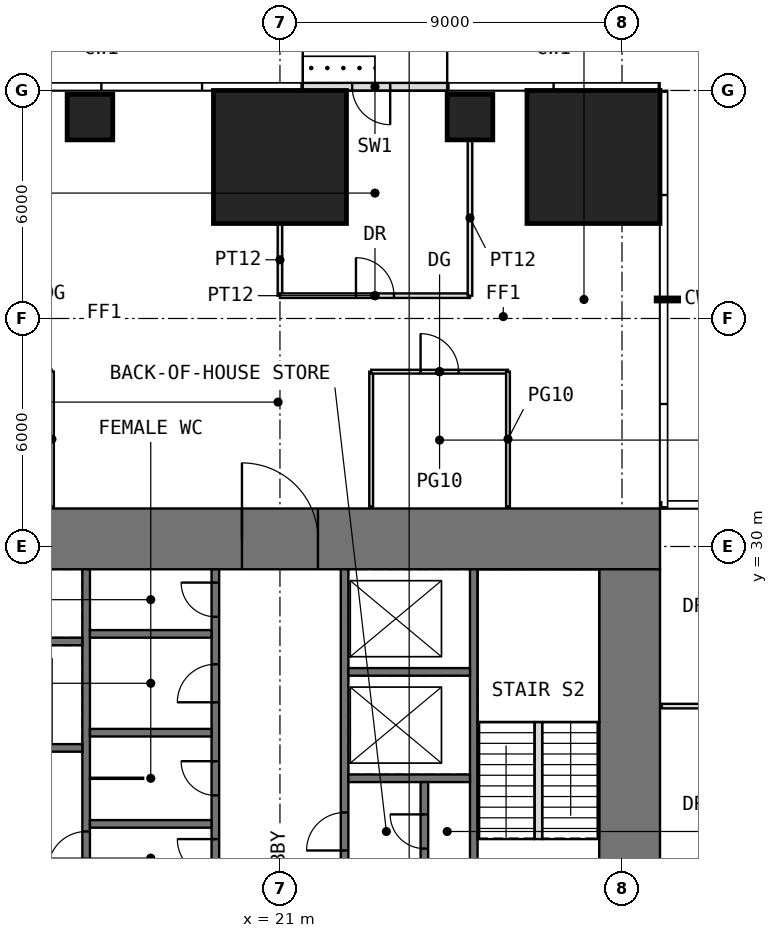
"""IFC4 building model, lengths in metres.
Left out: names, types, materials, properties, quantities, classifications, styles, units other than length and angle.
Written with IfcOpenShell. Run it as: python <this file> out.ifc"""

import sys

from ifc_helpers import new_model, si_unit, direction, frame, frame_2d, origin, origin_2d, place, context, subcontext, project, spatial, rectangle, extrude, element, fill, save


model = new_model("IFC4")
c1 = context("Model", 3, precision=1e-05, world=origin(), true_north=direction((0.0, 1.0)))
c2 = subcontext(c1, "Body", "Model", "MODEL_VIEW")
j1 = project(units=[si_unit("LENGTHUNIT", "METRE"), si_unit("PLANEANGLEUNIT", "RADIAN")], contexts=[c1])
p1 = place(None, origin())
s1 = spatial("IfcSite", under=j1, at=p1, CompositionType="ELEMENT")
p2 = place(p1, origin())
s2 = spatial("IfcBuilding", under=s1, at=p2, CompositionType="ELEMENT")
p3 = place(p2, frame((0.0, 0.0, 96.5)))
s3 = spatial("IfcBuildingStorey", under=s2, at=p3, CompositionType="ELEMENT", Elevation=96.5)
p4 = place(p3, frame((16.0, 41.3, 0.0), z_axis=(0.0, 0.0, 1.0), x_axis=(1.0, 0.0, 0.0)))
e1 = element("IfcColumn", 1, at=p4, inside=s3, PredefinedType="COLUMN", context=c2, shape_type="SweptSolid", body=[
    extrude(rectangle(XDim=1.2, YDim=1.2, at=origin_2d()), origin(), (0.0, 0.0, 1.0), 4.0),
])
p5 = place(p3, frame((21.0, 40.25, 0.0), z_axis=(0.0, 0.0, 1.0), x_axis=(1.0, 0.0, 0.0)))
e2 = element("IfcColumn", 2, at=p5, inside=s3, PredefinedType="COLUMN", context=c2, shape_type="SweptSolid", body=[
    extrude(rectangle(XDim=3.5, YDim=3.5, at=origin_2d()), origin(), (0.0, 0.0, 1.0), 4.0),
])
p6 = place(p3, frame((26.0, 41.3, 0.0), z_axis=(0.0, 0.0, 1.0), x_axis=(1.0, 0.0, 0.0)))
e3 = element("IfcColumn", 3, at=p6, inside=s3, PredefinedType="COLUMN", context=c2, shape_type="SweptSolid", body=[
    extrude(rectangle(XDim=1.2, YDim=1.2, at=origin_2d()), origin(), (0.0, 0.0, 1.0), 4.0),
])
p7 = place(p3, frame((29.25, 40.25, 0.0), z_axis=(0.0, 0.0, 1.0), x_axis=(1.0, 0.0, 0.0)))
e4 = element("IfcColumn", 4, at=p7, inside=s3, PredefinedType="COLUMN", context=c2, shape_type="SweptSolid", body=[
    extrude(rectangle(XDim=3.5, YDim=3.5, at=origin_2d()), origin(), (0.0, 0.0, 1.0), 4.0),
])
p8 = place(p3, frame((25.4, 42.1, 0.0), z_axis=(0.0, 0.0, 1.0), x_axis=(-1.0, 0.0, 0.0)))
e5 = element("IfcWall", 5, at=p8, inside=s3, PredefinedType="USERDEFINED", context=c2, shape_type="SweptSolid", body=[
    extrude(rectangle(XDim=3.8, YDim=0.2, at=frame_2d((1.9, 0.0))), origin(), (0.0, 0.0, 1.0), 3.75),
])
p9 = place(p8, frame((1.5, 0.0, 0.0)))
e6 = element("IfcOpeningElement", 6, at=p9, cuts=e5, PredefinedType="OPENING", context=c2, shape_type="SweptSolid", body=[
    extrude(rectangle(XDim=1.0, YDim=2.4, at=frame_2d((0.5, 1.2))), frame((0.0, 0.11, 0.0), z_axis=(0.0, -1.0, 0.0), x_axis=(1.0, 0.0, 0.0)), (0.0, 0.0, 1.0), 0.22),
])
p10 = place(p3, frame((11.0, 30.2, -0.05), z_axis=(0.0, 0.0, 1.0), x_axis=(1.0, 0.0, 0.0)))
e7 = element("IfcWall", 7, at=p10, inside=s3, PredefinedType="SHEAR", context=c2, shape_type="SweptSolid", body=[
    extrude(rectangle(XDim=20.0, YDim=1.6, at=frame_2d((10.0, 0.0))), origin(), (0.0, 0.0, 1.0), 4.0),
])
p11 = place(p10, frame((9.0, 0.0, 0.05)))
e8 = element("IfcOpeningElement", 8, at=p11, cuts=e7, PredefinedType="OPENING", context=c2, shape_type="SweptSolid", body=[
    extrude(rectangle(XDim=2.0, YDim=2.2, at=frame_2d((1.0, 1.1))), frame((0.0, 0.81, 0.0), z_axis=(0.0, -1.0, 0.0), x_axis=(1.0, 0.0, 0.0)), (0.0, 0.0, 1.0), 1.62),
])
p12 = place(p3, frame((30.2, 12.6, -0.05), z_axis=(0.0, 0.0, 1.0), x_axis=(0.0, 1.0, 0.0)))
e9 = element("IfcWall", 9, at=p12, inside=s3, PredefinedType="SHEAR", context=c2, shape_type="SweptSolid", body=[
    extrude(rectangle(XDim=16.8, YDim=1.6, at=frame_2d((8.4, 0.0))), origin(), (0.0, 0.0, 1.0), 4.0),
])
p13 = place(p12, frame((5.9, 0.0, 0.05)))
e10 = element("IfcOpeningElement", 10, at=p13, cuts=e9, PredefinedType="OPENING", context=c2, shape_type="SweptSolid", body=[
    extrude(rectangle(XDim=1.0, YDim=2.2, at=frame_2d((0.5, 1.1))), frame((0.0, 0.81, 0.0), z_axis=(0.0, -1.0, 0.0), x_axis=(1.0, 0.0, 0.0)), (0.0, 0.0, 1.0), 1.62),
])
p14 = place(p3, frame((15.9, 12.6, -0.05), z_axis=(0.0, 0.0, 1.0), x_axis=(0.0, 1.0, 0.0)))
e11 = element("IfcWall", 11, at=p14, inside=s3, PredefinedType="SHEAR", context=c2, shape_type="SweptSolid", body=[
    extrude(rectangle(XDim=16.8, YDim=0.2, at=frame_2d((8.4, 0.0))), origin(), (0.0, 0.0, 1.0), 4.0),
])
p15 = place(p14, frame((8.9, 0.0, 0.05)))
e12 = element("IfcOpeningElement", 12, at=p15, cuts=e11, PredefinedType="OPENING", context=c2, shape_type="SweptSolid", body=[
    extrude(rectangle(XDim=1.0, YDim=2.2, at=frame_2d((0.5, 1.1))), frame((0.0, 0.11, 0.0), z_axis=(0.0, -1.0, 0.0), x_axis=(1.0, 0.0, 0.0)), (0.0, 0.0, 1.0), 0.22),
])
p16 = place(p3, frame((19.3, 12.6, -0.05), z_axis=(0.0, 0.0, 1.0), x_axis=(0.0, 1.0, 0.0)))
e13 = element("IfcWall", 13, at=p16, inside=s3, PredefinedType="SHEAR", context=c2, shape_type="SweptSolid", body=[
    extrude(rectangle(XDim=16.8, YDim=0.2, at=frame_2d((8.4, 0.0))), origin(), (0.0, 0.0, 1.0), 4.0),
])
p17 = place(p16, frame((8.7, 0.0, 0.05)))
e14 = element("IfcOpeningElement", 14, at=p17, cuts=e13, PredefinedType="OPENING", context=c2, shape_type="SweptSolid", body=[
    extrude(rectangle(XDim=1.0, YDim=2.2, at=frame_2d((0.5, 1.1))), frame((0.0, 0.11, 0.0), z_axis=(0.0, -1.0, 0.0), x_axis=(1.0, 0.0, 0.0)), (0.0, 0.0, 1.0), 0.22),
])
p18 = place(p16, frame((10.85, 0.0, 0.05)))
e15 = element("IfcOpeningElement", 15, at=p18, cuts=e13, PredefinedType="OPENING", context=c2, shape_type="SweptSolid", body=[
    extrude(rectangle(XDim=0.9, YDim=2.2, at=frame_2d((0.45, 1.1))), frame((0.0, 0.11, 0.0), z_axis=(0.0, -1.0, 0.0), x_axis=(1.0, 0.0, 0.0)), (0.0, 0.0, 1.0), 0.22),
])
p19 = place(p16, frame((13.3, 0.0, 0.05)))
e16 = element("IfcOpeningElement", 16, at=p19, cuts=e13, PredefinedType="OPENING", context=c2, shape_type="SweptSolid", body=[
    extrude(rectangle(XDim=1.0, YDim=2.2, at=frame_2d((0.5, 1.1))), frame((0.0, 0.11, 0.0), z_axis=(0.0, -1.0, 0.0), x_axis=(1.0, 0.0, 0.0)), (0.0, 0.0, 1.0), 0.22),
])
p20 = place(p16, frame((15.55, 0.0, 0.05)))
e17 = element("IfcOpeningElement", 17, at=p20, cuts=e13, PredefinedType="OPENING", context=c2, shape_type="SweptSolid", body=[
    extrude(rectangle(XDim=0.9, YDim=2.2, at=frame_2d((0.45, 1.1))), frame((0.0, 0.11, 0.0), z_axis=(0.0, -1.0, 0.0), x_axis=(1.0, 0.0, 0.0)), (0.0, 0.0, 1.0), 0.22),
])
p21 = place(p16, frame((0.75, 0.0, 0.05)))
e18 = element("IfcOpeningElement", 18, at=p21, cuts=e13, PredefinedType="OPENING", context=c2, shape_type="SweptSolid", body=[
    extrude(rectangle(XDim=1.1, YDim=2.2, at=frame_2d((0.55, 1.1))), frame((0.0, 0.11, 0.0), z_axis=(0.0, -1.0, 0.0), x_axis=(1.0, 0.0, 0.0)), (0.0, 0.0, 1.0), 0.22),
])
p22 = place(p16, frame((3.55, 0.0, 0.05)))
e19 = element("IfcOpeningElement", 19, at=p22, cuts=e13, PredefinedType="OPENING", context=c2, shape_type="SweptSolid", body=[
    extrude(rectangle(XDim=1.1, YDim=2.2, at=frame_2d((0.55, 1.1))), frame((0.0, 0.11, 0.0), z_axis=(0.0, -1.0, 0.0), x_axis=(1.0, 0.0, 0.0)), (0.0, 0.0, 1.0), 0.22),
])
p23 = place(p16, frame((6.35, 0.0, 0.05)))
e20 = element("IfcOpeningElement", 20, at=p23, cuts=e13, PredefinedType="OPENING", context=c2, shape_type="SweptSolid", body=[
    extrude(rectangle(XDim=1.1, YDim=2.2, at=frame_2d((0.55, 1.1))), frame((0.0, 0.11, 0.0), z_axis=(0.0, -1.0, 0.0), x_axis=(1.0, 0.0, 0.0)), (0.0, 0.0, 1.0), 0.22),
])
p24 = place(p3, frame((22.7, 12.6, -0.05), z_axis=(0.0, 0.0, 1.0), x_axis=(0.0, 1.0, 0.0)))
e21 = element("IfcWall", 21, at=p24, inside=s3, PredefinedType="SHEAR", context=c2, shape_type="SweptSolid", body=[
    extrude(rectangle(XDim=16.8, YDim=0.2, at=frame_2d((8.4, 0.0))), origin(), (0.0, 0.0, 1.0), 4.0),
])
p25 = place(p24, frame((3.05, 0.0, 0.05)))
e22 = element("IfcOpeningElement", 22, at=p25, cuts=e21, PredefinedType="OPENING", context=c2, shape_type="SweptSolid", body=[
    extrude(rectangle(XDim=0.9, YDim=2.2, at=frame_2d((0.45, 1.1))), frame((0.0, 0.11, 0.0), z_axis=(0.0, -1.0, 0.0), x_axis=(1.0, 0.0, 0.0)), (0.0, 0.0, 1.0), 0.22),
])
p26 = place(p24, frame((7.1, 0.0, 0.05)))
e23 = element("IfcOpeningElement", 23, at=p26, cuts=e21, PredefinedType="OPENING", context=c2, shape_type="SweptSolid", body=[
    extrude(rectangle(XDim=1.0, YDim=2.2, at=frame_2d((0.5, 1.1))), frame((0.0, 0.11, 0.0), z_axis=(0.0, -1.0, 0.0), x_axis=(1.0, 0.0, 0.0)), (0.0, 0.0, 1.0), 0.22),
])
p27 = place(p24, frame((1.55, 0.0, 0.05)))
e24 = element("IfcOpeningElement", 24, at=p27, cuts=e21, PredefinedType="OPENING", context=c2, shape_type="SweptSolid", body=[
    extrude(rectangle(XDim=0.9, YDim=2.2, at=frame_2d((0.45, 1.1))), frame((0.0, 0.11, 0.0), z_axis=(0.0, -1.0, 0.0), x_axis=(1.0, 0.0, 0.0)), (0.0, 0.0, 1.0), 0.22),
])
p28 = place(p24, frame((4.95, 0.0, 0.05)))
e25 = element("IfcOpeningElement", 25, at=p28, cuts=e21, PredefinedType="OPENING", context=c2, shape_type="SweptSolid", body=[
    extrude(rectangle(XDim=0.9, YDim=2.2, at=frame_2d((0.45, 1.1))), frame((0.0, 0.11, 0.0), z_axis=(0.0, -1.0, 0.0), x_axis=(1.0, 0.0, 0.0)), (0.0, 0.0, 1.0), 0.22),
])
p29 = place(p24, frame((9.4, 0.0, 0.05)))
e26 = element("IfcOpeningElement", 26, at=p29, cuts=e21, PredefinedType="OPENING", context=c2, shape_type="SweptSolid", body=[
    extrude(rectangle(XDim=1.0, YDim=2.2, at=frame_2d((0.5, 1.1))), frame((0.0, 0.11, 0.0), z_axis=(0.0, -1.0, 0.0), x_axis=(1.0, 0.0, 0.0)), (0.0, 0.0, 1.0), 0.22),
])
p30 = place(p3, frame((26.1, 12.6, -0.05), z_axis=(0.0, 0.0, 1.0), x_axis=(0.0, 1.0, 0.0)))
e27 = element("IfcWall", 27, at=p30, inside=s3, PredefinedType="SHEAR", context=c2, shape_type="SweptSolid", body=[
    extrude(rectangle(XDim=16.8, YDim=0.2, at=frame_2d((8.4, 0.0))), origin(), (0.0, 0.0, 1.0), 4.0),
])
p31 = place(p30, frame((6.9, 0.0, 0.05)))
e28 = element("IfcOpeningElement", 28, at=p31, cuts=e27, PredefinedType="OPENING", context=c2, shape_type="SweptSolid", body=[
    extrude(rectangle(XDim=1.0, YDim=2.2, at=frame_2d((0.5, 1.1))), frame((0.0, 0.11, 0.0), z_axis=(0.0, -1.0, 0.0), x_axis=(1.0, 0.0, 0.0)), (0.0, 0.0, 1.0), 0.22),
])
p32 = place(p3, frame((12.6, 24.7, -0.05), z_axis=(0.0, 0.0, 1.0), x_axis=(1.0, 0.0, 0.0)))
e29 = element("IfcWall", 29, at=p32, inside=s3, PredefinedType="SHEAR", context=c2, shape_type="SweptSolid", body=[
    extrude(rectangle(XDim=3.2, YDim=0.2, at=frame_2d((1.6, 0.0))), origin(), (0.0, 0.0, 1.0), 4.0),
])
p33 = place(p32, frame((1.0, 0.0, 0.05)))
e30 = element("IfcOpeningElement", 30, at=p33, cuts=e29, PredefinedType="OPENING", context=c2, shape_type="SweptSolid", body=[
    extrude(rectangle(XDim=1.2, YDim=2.2, at=frame_2d((0.6, 1.1))), frame((0.0, 0.11, 0.0), z_axis=(0.0, -1.0, 0.0), x_axis=(1.0, 0.0, 0.0)), (0.0, 0.0, 1.0), 0.22),
])
for number, where, z_axis, x_axis in (
    (31, (12.6, 27.5, -0.05), (0.0, 0.0, 1.0), (1.0, 0.0, 0.0)),
    (32, (16.0, 22.7, -0.05), (0.0, 0.0, 1.0), (1.0, 0.0, 0.0)),
    (33, (16.0, 25.1, -0.05), (0.0, 0.0, 1.0), (1.0, 0.0, 0.0)),
    (34, (16.0, 27.7, -0.05), (0.0, 0.0, 1.0), (1.0, 0.0, 0.0)),
    (35, (22.8, 23.9, -0.05), (0.0, 0.0, 1.0), (1.0, 0.0, 0.0)),
    (36, (22.8, 26.7, -0.05), (0.0, 0.0, 1.0), (1.0, 0.0, 0.0)),
):
    element("IfcWall", number, at=place(p3, frame(where, z_axis=z_axis, x_axis=x_axis)), inside=s3, PredefinedType="SHEAR", context=c2, shape_type="SweptSolid", body=[
        extrude(rectangle(XDim=3.2, YDim=0.2, at=frame_2d((1.6, 0.0))), origin(), (0.0, 0.0, 1.0), 4.0),
    ])
p34 = place(p3, frame((16.0, 23.9, 0.0), z_axis=(0.0, 0.0, 1.0), x_axis=(1.0, 0.0, 0.0)))
e37 = element("IfcWall", 37, at=p34, inside=s3, PredefinedType="PARTITIONING", context=c2, shape_type="SweptSolid", body=[
    extrude(rectangle(XDim=1.4, YDim=0.03, at=frame_2d((0.7, 0.0))), origin(), (0.0, 0.0, 1.0), 3.75),
])
p35 = place(p3, frame((24.8, 21.2, -0.05), z_axis=(0.0, 0.0, 1.0), x_axis=(0.0, 1.0, 0.0)))
e38 = element("IfcWall", 38, at=p35, inside=s3, PredefinedType="SHEAR", context=c2, shape_type="SweptSolid", body=[
    extrude(rectangle(XDim=2.6, YDim=0.2, at=frame_2d((1.3, 0.0))), origin(), (0.0, 0.0, 1.0), 4.0),
])
p36 = place(p35, frame((0.85, 0.0, 0.05)))
e39 = element("IfcOpeningElement", 39, at=p36, cuts=e38, PredefinedType="OPENING", context=c2, shape_type="SweptSolid", body=[
    extrude(rectangle(XDim=0.9, YDim=2.2, at=frame_2d((0.45, 1.1))), frame((0.0, 0.11, 0.0), z_axis=(0.0, -1.0, 0.0), x_axis=(1.0, 0.0, 0.0)), (0.0, 0.0, 1.0), 0.22),
])
p37 = place(p3, frame((15.0, 31.05, 0.0), z_axis=(0.0, 0.0, 1.0), x_axis=(0.0, 1.0, 0.0)))
e40 = element("IfcWall", 40, at=p37, inside=s3, PredefinedType="PARTITIONING", context=c2, shape_type="SweptSolid", body=[
    extrude(rectangle(XDim=3.55, YDim=0.1, at=frame_2d((1.775, 0.0))), origin(), (0.0, 0.0, 1.0), 3.75),
])
p38 = place(p3, frame((21.0, 36.6, 0.0), z_axis=(0.0, 0.0, 1.0), x_axis=(0.0, 1.0, 0.0)))
e41 = element("IfcWall", 41, at=p38, inside=s3, PredefinedType="PARTITIONING", context=c2, shape_type="SweptSolid", body=[
    extrude(rectangle(XDim=1.89, YDim=0.12, at=frame_2d((0.945, 0.0))), origin(), (0.0, 0.0, 1.0), 3.75),
])
p39 = place(p3, frame((21.0, 36.6, 0.0), z_axis=(0.0, 0.0, 1.0), x_axis=(1.0, 0.0, 0.0)))
e42 = element("IfcWall", 42, at=p39, inside=s3, PredefinedType="PARTITIONING", context=c2, shape_type="SweptSolid", body=[
    extrude(rectangle(XDim=5.0, YDim=0.12, at=frame_2d((2.5, 0.0))), origin(), (0.0, 0.0, 1.0), 3.75),
])
p40 = place(p39, frame((2.0, 0.0, 0.0)))
e43 = element("IfcOpeningElement", 43, at=p40, cuts=e42, PredefinedType="OPENING", context=c2, shape_type="SweptSolid", body=[
    extrude(rectangle(XDim=1.0, YDim=2.2, at=frame_2d((0.5, 1.1))), frame((0.0, 0.07, 0.0), z_axis=(0.0, -1.0, 0.0), x_axis=(1.0, 0.0, 0.0)), (0.0, 0.0, 1.0), 0.14),
])
p41 = place(p3, frame((23.4, 31.05, 0.0), z_axis=(0.0, 0.0, 1.0), x_axis=(0.0, 1.0, 0.0)))
e44 = element("IfcWall", 44, at=p41, inside=s3, PredefinedType="PARTITIONING", context=c2, shape_type="SweptSolid", body=[
    extrude(rectangle(XDim=3.55, YDim=0.1, at=frame_2d((1.775, 0.0))), origin(), (0.0, 0.0, 1.0), 3.75),
])
p42 = place(p3, frame((23.4, 34.6, 0.0), z_axis=(0.0, 0.0, 1.0), x_axis=(1.0, 0.0, 0.0)))
e45 = element("IfcWall", 45, at=p42, inside=s3, PredefinedType="PARTITIONING", context=c2, shape_type="SweptSolid", body=[
    extrude(rectangle(XDim=3.6, YDim=0.1, at=frame_2d((1.8, 0.0))), origin(), (0.0, 0.0, 1.0), 3.75),
])
p43 = place(p42, frame((1.3, 0.0, 0.0)))
e46 = element("IfcOpeningElement", 46, at=p43, cuts=e45, PredefinedType="OPENING", context=c2, shape_type="SweptSolid", body=[
    extrude(rectangle(XDim=1.0, YDim=2.4, at=frame_2d((0.5, 1.2))), frame((0.0, 0.06, 0.0), z_axis=(0.0, -1.0, 0.0), x_axis=(1.0, 0.0, 0.0)), (0.0, 0.0, 1.0), 0.12),
])
p44 = place(p3, frame((26.0, 36.6, 0.0), z_axis=(0.0, 0.0, 1.0), x_axis=(0.0, 1.0, 0.0)))
e47 = element("IfcWall", 47, at=p44, inside=s3, PredefinedType="PARTITIONING", context=c2, shape_type="SweptSolid", body=[
    extrude(rectangle(XDim=4.09, YDim=0.12, at=frame_2d((2.045, 0.0))), origin(), (0.0, 0.0, 1.0), 3.75),
])
p45 = place(p3, frame((27.0, 31.05, 0.0), z_axis=(0.0, 0.0, 1.0), x_axis=(0.0, 1.0, 0.0)))
e48 = element("IfcWall", 48, at=p45, inside=s3, PredefinedType="PARTITIONING", context=c2, shape_type="SweptSolid", body=[
    extrude(rectangle(XDim=3.55, YDim=0.1, at=frame_2d((1.775, 0.0))), origin(), (0.0, 0.0, 1.0), 3.75),
])
p46 = place(p3, frame((31.05, 25.8, 0.0), z_axis=(0.0, 0.0, 1.0), x_axis=(1.0, 0.0, 0.0)))
e49 = element("IfcWall", 49, at=p46, inside=s3, PredefinedType="PARTITIONING", context=c2, shape_type="SweptSolid", body=[
    extrude(rectangle(XDim=3.05, YDim=0.12, at=frame_2d((1.525, 0.0))), origin(), (0.0, 0.0, 1.0), 3.75),
])
p47 = place(p3, frame((27.8, 22.3, 0.0), z_axis=(0.0, 0.0, 1.0), x_axis=(0.0, 1.0, 0.0)))
e50 = element("IfcWall", 50, at=p47, inside=s3, PredefinedType="PARTITIONING", context=c2, shape_type="SweptSolid", body=[
    extrude(rectangle(XDim=3.08, YDim=0.2, at=frame_2d((1.54, 0.0))), origin(), (0.0, 0.0, 1.0), 4.0),
])
p48 = place(p9, origin())
e51 = element("IfcDoor", 51, at=p48, inside=s3, OperationType="SINGLE_SWING_LEFT", PredefinedType="DOOR", context=c2, shape_type="SweptSolid", body=[
    extrude(rectangle(XDim=1.0, YDim=2.4, at=frame_2d((0.5, 1.2))), frame((0.0, 0.025, 0.0), z_axis=(0.0, -1.0, 0.0), x_axis=(1.0, 0.0, 0.0)), (0.0, 0.0, 1.0), 0.05),
])
fill(e6, e51)
p49 = place(p11, origin())
e52 = element("IfcDoor", 52, at=p49, inside=s3, OperationType="DOUBLE_DOOR_SINGLE_SWING", PredefinedType="DOOR", context=c2, shape_type="SweptSolid", body=[
    extrude(rectangle(XDim=2.0, YDim=2.2, at=frame_2d((1.0, 1.1))), frame((0.0, 0.025, 0.0), z_axis=(0.0, -1.0, 0.0), x_axis=(1.0, 0.0, 0.0)), (0.0, 0.0, 1.0), 0.05),
])
fill(e8, e52)
p50 = place(p15, origin())
e53 = element("IfcDoor", 53, at=p50, inside=s3, OperationType="SINGLE_SWING_LEFT", PredefinedType="DOOR", context=c2, shape_type="SweptSolid", body=[
    extrude(rectangle(XDim=1.0, YDim=2.2, at=frame_2d((0.5, 1.1))), frame((0.0, 0.025, 0.0), z_axis=(0.0, -1.0, 0.0), x_axis=(1.0, 0.0, 0.0)), (0.0, 0.0, 1.0), 0.05),
])
fill(e12, e53)
p51 = place(p17, origin())
e54 = element("IfcDoor", 54, at=p51, inside=s3, OperationType="SINGLE_SWING_RIGHT", PredefinedType="DOOR", context=c2, shape_type="SweptSolid", body=[
    extrude(rectangle(XDim=1.0, YDim=2.2, at=frame_2d((0.5, 1.1))), frame((0.0, 0.025, 0.0), z_axis=(0.0, -1.0, 0.0), x_axis=(1.0, 0.0, 0.0)), (0.0, 0.0, 1.0), 0.05),
])
fill(e14, e54)
p52 = place(p18, origin())
e55 = element("IfcDoor", 55, at=p52, inside=s3, OperationType="SINGLE_SWING_RIGHT", PredefinedType="DOOR", context=c2, shape_type="SweptSolid", body=[
    extrude(rectangle(XDim=0.9, YDim=2.2, at=frame_2d((0.45, 1.1))), frame((0.0, 0.025, 0.0), z_axis=(0.0, -1.0, 0.0), x_axis=(1.0, 0.0, 0.0)), (0.0, 0.0, 1.0), 0.05),
])
fill(e15, e55)
p53 = place(p19, origin())
e56 = element("IfcDoor", 56, at=p53, inside=s3, OperationType="SINGLE_SWING_LEFT", PredefinedType="DOOR", context=c2, shape_type="SweptSolid", body=[
    extrude(rectangle(XDim=1.0, YDim=2.2, at=frame_2d((0.5, 1.1))), frame((0.0, 0.025, 0.0), z_axis=(0.0, -1.0, 0.0), x_axis=(1.0, 0.0, 0.0)), (0.0, 0.0, 1.0), 0.05),
])
fill(e16, e56)
p54 = place(p20, origin())
e57 = element("IfcDoor", 57, at=p54, inside=s3, OperationType="SINGLE_SWING_RIGHT", PredefinedType="DOOR", context=c2, shape_type="SweptSolid", body=[
    extrude(rectangle(XDim=0.9, YDim=2.2, at=frame_2d((0.45, 1.1))), frame((0.0, 0.025, 0.0), z_axis=(0.0, -1.0, 0.0), x_axis=(1.0, 0.0, 0.0)), (0.0, 0.0, 1.0), 0.05),
])
fill(e17, e57)
p55 = place(p29, origin())
e58 = element("IfcDoor", 58, at=p55, inside=s3, OperationType="SINGLE_SWING_LEFT", PredefinedType="DOOR", context=c2, shape_type="SweptSolid", body=[
    extrude(rectangle(XDim=1.0, YDim=2.2, at=frame_2d((0.5, 1.1))), frame((0.0, 0.025, 0.0), z_axis=(0.0, -1.0, 0.0), x_axis=(1.0, 0.0, 0.0)), (0.0, 0.0, 1.0), 0.05),
])
fill(e26, e58)
p56 = place(p36, origin())
e59 = element("IfcDoor", 59, at=p56, inside=s3, OperationType="SINGLE_SWING_RIGHT", PredefinedType="DOOR", context=c2, shape_type="SweptSolid", body=[
    extrude(rectangle(XDim=0.9, YDim=2.2, at=frame_2d((0.45, 1.1))), frame((0.0, 0.025, 0.0), z_axis=(0.0, -1.0, 0.0), x_axis=(1.0, 0.0, 0.0)), (0.0, 0.0, 1.0), 0.05),
])
fill(e39, e59)
p57 = place(p43, origin())
e60 = element("IfcDoor", 60, at=p57, inside=s3, OperationType="SINGLE_SWING_LEFT", PredefinedType="DOOR", context=c2, shape_type="SweptSolid", body=[
    extrude(rectangle(XDim=1.0, YDim=2.4, at=frame_2d((0.5, 1.2))), frame((0.0, 0.025, 0.0), z_axis=(0.0, -1.0, 0.0), x_axis=(1.0, 0.0, 0.0)), (0.0, 0.0, 1.0), 0.05),
])
fill(e46, e60)
p58 = place(p40, origin())
e61 = element("IfcDoor", 61, at=p58, inside=s3, OperationType="SINGLE_SWING_LEFT", PredefinedType="DOOR", context=c2, shape_type="SweptSolid", body=[
    extrude(rectangle(XDim=1.0, YDim=2.2, at=frame_2d((0.5, 1.1))), frame((0.0, 0.025, 0.0), z_axis=(0.0, -1.0, 0.0), x_axis=(1.0, 0.0, 0.0)), (0.0, 0.0, 1.0), 0.05),
])
fill(e43, e61)
save(model, sys.argv[1])
